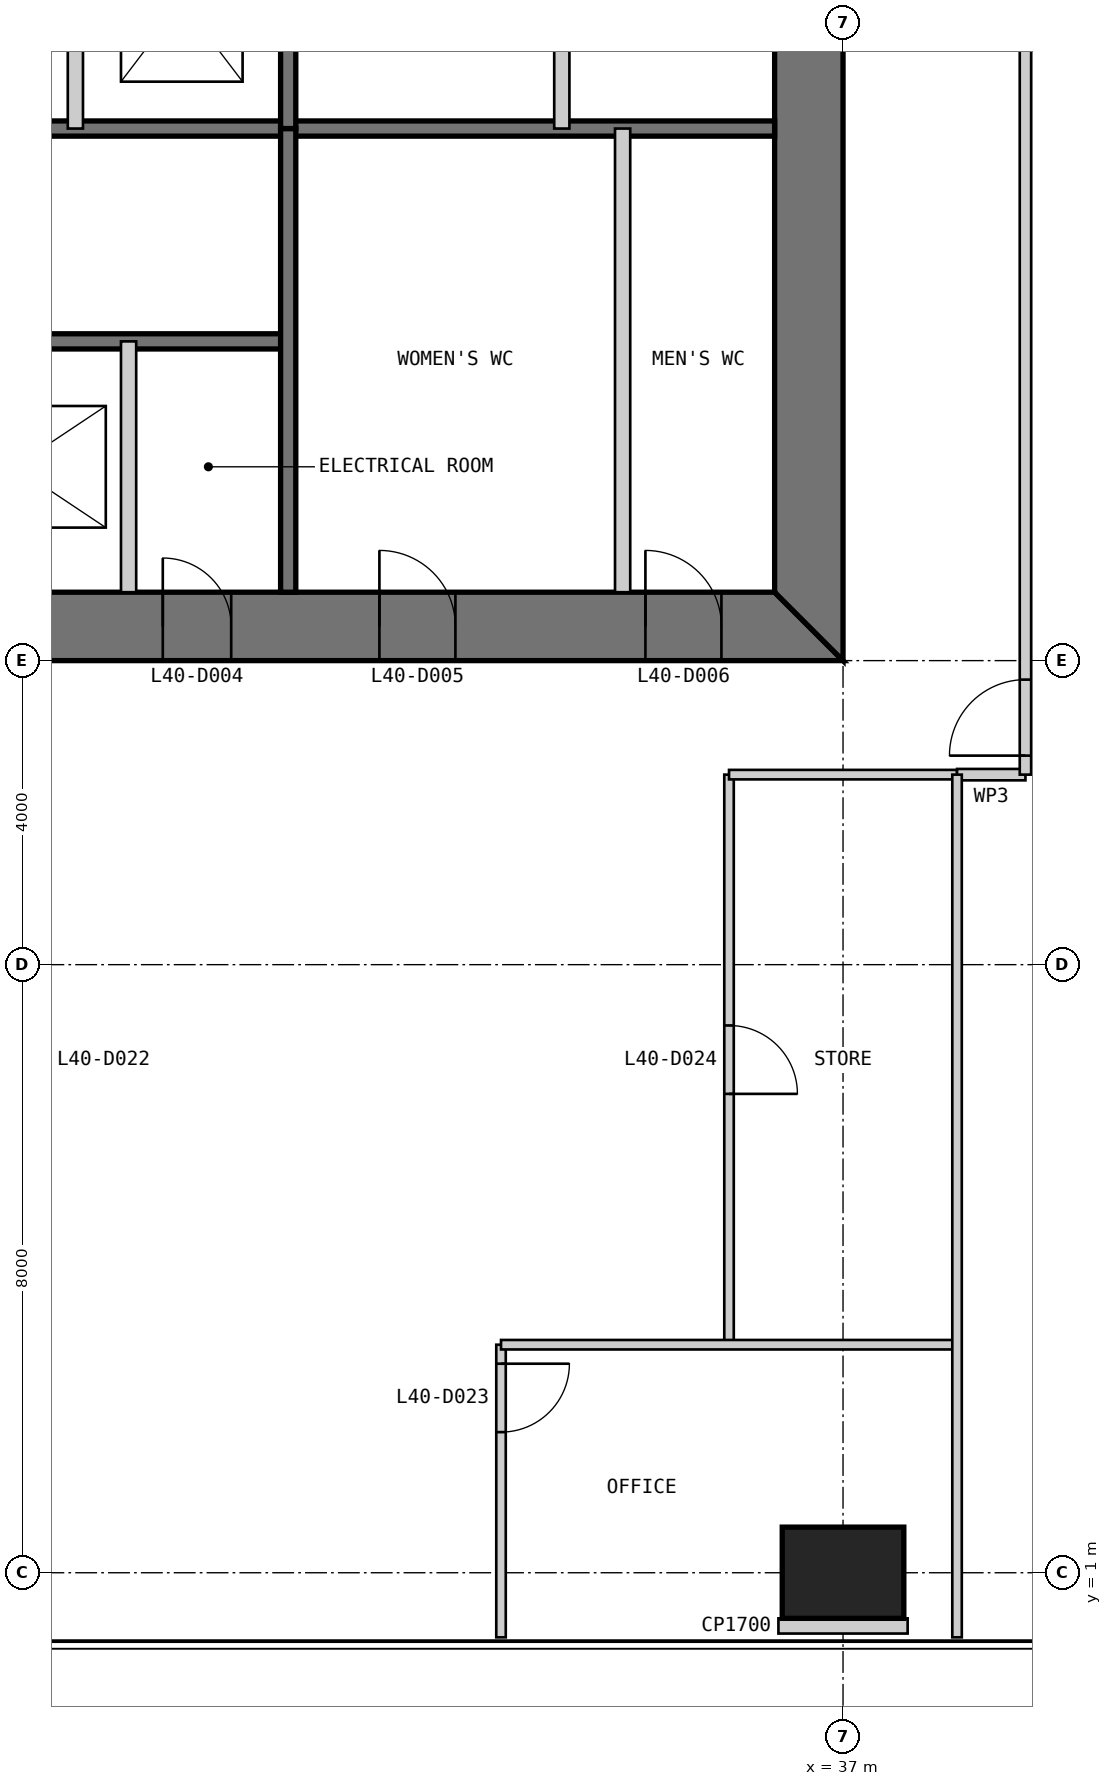
"""IFC4 building model, lengths in metres.
Left out: names, types, materials, properties, quantities, classifications, styles, units other than length and angle.
Written with IfcOpenShell. Run it as: python <this file> out.ifc"""

import sys

from ifc_helpers import new_model, si_unit, direction, frame, frame_2d, origin, origin_2d, place, context, subcontext, project, spatial, polyline, rectangle, outline, extrude, element, fill, save


model = new_model("IFC4")
c1 = context("Model", 3, precision=1e-05, world=origin(), true_north=direction((0.0, 1.0)))
c2 = subcontext(c1, "Body", "Model", "MODEL_VIEW")
j1 = project(units=[si_unit("LENGTHUNIT", "METRE"), si_unit("PLANEANGLEUNIT", "RADIAN")], contexts=[c1])
p1 = place(None, origin())
s1 = spatial("IfcSite", under=j1, at=p1, CompositionType="ELEMENT")
p2 = place(p1, origin())
s2 = spatial("IfcBuilding", under=s1, at=p2, CompositionType="ELEMENT")
p3 = place(p2, frame((0.0, 0.0, 173.8)))
s3 = spatial("IfcBuildingStorey", under=s2, at=p3, CompositionType="ELEMENT", Elevation=173.8)
p4 = place(p3, frame((37.0, 1.0, 0.0), z_axis=(0.0, 0.0, 1.0), x_axis=(1.0, 0.0, 0.0)))
e1 = element("IfcColumn", 1, at=p4, inside=s3, PredefinedType="COLUMN", context=c2, shape_type="SweptSolid", body=[
    extrude(rectangle(XDim=1.6, YDim=1.2, at=origin_2d()), origin(), (0.0, 0.0, 1.0), 4.0),
])
p5 = place(p3, frame((13.0, 13.45, 0.0), z_axis=(0.0, 0.0, 1.0), x_axis=(1.0, 0.0, 0.0)))
e2 = element("IfcWall", 2, at=p5, inside=s3, PredefinedType="SHEAR", context=c2, shape_type="SweptSolid", body=[
    extrude(outline(polyline([(0.0, -0.45), (24.0, -0.45), (23.1, 0.45), (0.9, 0.45), (0.0, -0.45)])), origin(), (0.0, 0.0, 1.0), 4.0),
])
p6 = place(p5, frame((4.9, 0.0, 0.0)))
e3 = element("IfcOpeningElement", 3, at=p6, cuts=e2, PredefinedType="OPENING", context=c2, shape_type="SweptSolid", body=[
    extrude(rectangle(XDim=1.0, YDim=2.2, at=frame_2d((0.5, 1.1))), frame((0.0, 0.46, 0.0), z_axis=(0.0, -1.0, 0.0), x_axis=(1.0, 0.0, 0.0)), (0.0, 0.0, 1.0), 0.92),
])
p7 = place(p5, frame((8.9, 0.0, 0.0)))
e4 = element("IfcOpeningElement", 4, at=p7, cuts=e2, PredefinedType="OPENING", context=c2, shape_type="SweptSolid", body=[
    extrude(rectangle(XDim=1.1, YDim=2.2, at=frame_2d((0.55, 1.1))), frame((0.0, 0.46, 0.0), z_axis=(0.0, -1.0, 0.0), x_axis=(1.0, 0.0, 0.0)), (0.0, 0.0, 1.0), 0.92),
])
p8 = place(p5, frame((15.05, 0.0, 0.0)))
e5 = element("IfcOpeningElement", 5, at=p8, cuts=e2, PredefinedType="OPENING", context=c2, shape_type="SweptSolid", body=[
    extrude(rectangle(XDim=0.9, YDim=2.2, at=frame_2d((0.45, 1.1))), frame((0.0, 0.46, 0.0), z_axis=(0.0, -1.0, 0.0), x_axis=(1.0, 0.0, 0.0)), (0.0, 0.0, 1.0), 0.92),
])
p9 = place(p5, frame((17.9, 0.0, 0.0)))
e6 = element("IfcOpeningElement", 6, at=p9, cuts=e2, PredefinedType="OPENING", context=c2, shape_type="SweptSolid", body=[
    extrude(rectangle(XDim=1.0, YDim=2.2, at=frame_2d((0.5, 1.1))), frame((0.0, 0.46, 0.0), z_axis=(0.0, -1.0, 0.0), x_axis=(1.0, 0.0, 0.0)), (0.0, 0.0, 1.0), 0.92),
])
p10 = place(p5, frame((21.4, 0.0, 0.0)))
e7 = element("IfcOpeningElement", 7, at=p10, cuts=e2, PredefinedType="OPENING", context=c2, shape_type="SweptSolid", body=[
    extrude(rectangle(XDim=1.0, YDim=2.2, at=frame_2d((0.5, 1.1))), frame((0.0, 0.46, 0.0), z_axis=(0.0, -1.0, 0.0), x_axis=(1.0, 0.0, 0.0)), (0.0, 0.0, 1.0), 0.92),
])
p11 = place(p3, frame((36.55, 13.9, 0.0), z_axis=(0.0, 0.0, 1.0), x_axis=(0.0, 1.0, 0.0)))
e8 = element("IfcWall", 8, at=p11, inside=s3, PredefinedType="SHEAR", context=c2, shape_type="SweptSolid", body=[
    extrude(outline(polyline([(-0.9, -0.45), (23.1, -0.45), (22.2, 0.45), (0.0, 0.45), (-0.9, -0.45)])), origin(), (0.0, 0.0, 1.0), 4.0),
])
p12 = place(p11, frame((20.2, 0.0, 0.0)))
e9 = element("IfcOpeningElement", 9, at=p12, cuts=e8, PredefinedType="OPENING", context=c2, shape_type="SweptSolid", body=[
    extrude(rectangle(XDim=1.0, YDim=2.2, at=frame_2d((0.5, 1.1))), frame((0.0, 0.46, 0.0), z_axis=(0.0, -1.0, 0.0), x_axis=(1.0, 0.0, 0.0)), (0.0, 0.0, 1.0), 0.92),
])
p13 = place(p11, frame((17.25, 0.0, 0.0)))
e10 = element("IfcOpeningElement", 10, at=p13, cuts=e8, PredefinedType="OPENING", context=c2, shape_type="SweptSolid", body=[
    extrude(rectangle(XDim=0.9, YDim=2.2, at=frame_2d((0.45, 1.1))), frame((0.0, 0.46, 0.0), z_axis=(0.0, -1.0, 0.0), x_axis=(1.0, 0.0, 0.0)), (0.0, 0.0, 1.0), 0.92),
])
p14 = place(p3, frame((20.3, 17.2, 0.0), z_axis=(0.0, 0.0, 1.0), x_axis=(1.0, 0.0, 0.0)))
e11 = element("IfcWall", 11, at=p14, inside=s3, PredefinedType="SOLIDWALL", context=c2, shape_type="SweptSolid", body=[
    extrude(rectangle(XDim=9.4, YDim=0.2, at=frame_2d((4.7, 0.0))), origin(), (0.0, 0.0, 1.0), 3.8),
])
p15 = place(p14, frame((0.25, 0.0, 0.0)))
e12 = element("IfcOpeningElement", 12, at=p15, cuts=e11, PredefinedType="OPENING", context=c2, shape_type="SweptSolid", body=[
    extrude(rectangle(XDim=1.0, YDim=2.2, at=frame_2d((0.5, 1.1))), frame((0.0, 0.11, 0.0), z_axis=(0.0, -1.0, 0.0), x_axis=(1.0, 0.0, 0.0)), (0.0, 0.0, 1.0), 0.22),
])
p16 = place(p3, frame((20.3, 20.0, 0.0), z_axis=(0.0, 0.0, 1.0), x_axis=(1.0, 0.0, 0.0)))
e13 = element("IfcWall", 13, at=p16, inside=s3, PredefinedType="SOLIDWALL", context=c2, shape_type="SweptSolid", body=[
    extrude(rectangle(XDim=15.8, YDim=0.2, at=frame_2d((7.9, 0.0))), origin(), (0.0, 0.0, 1.0), 3.8),
])
p17 = place(p3, frame((27.6, 13.9, 0.0), z_axis=(0.0, 0.0, 1.0), x_axis=(0.0, 1.0, 0.0)))
e14 = element("IfcWall", 14, at=p17, inside=s3, PredefinedType="PARTITIONING", context=c2, shape_type="SweptSolid", body=[
    extrude(rectangle(XDim=3.3, YDim=0.2, at=frame_2d((1.65, 0.0))), origin(), (0.0, 0.0, 1.0), 3.8),
])
p18 = place(p3, frame((29.7, 13.9, 0.0), z_axis=(0.0, 0.0, 1.0), x_axis=(0.0, 1.0, 0.0)))
e15 = element("IfcWall", 15, at=p18, inside=s3, PredefinedType="SOLIDWALL", context=c2, shape_type="SweptSolid", body=[
    extrude(rectangle(XDim=6.1, YDim=0.2, at=frame_2d((3.05, 0.0))), origin(), (0.0, 0.0, 1.0), 3.8),
])
p19 = place(p3, frame((34.1, 13.9, 0.0), z_axis=(0.0, 0.0, 1.0), x_axis=(0.0, 1.0, 0.0)))
e16 = element("IfcWall", 16, at=p19, inside=s3, PredefinedType="PARTITIONING", context=c2, shape_type="SweptSolid", body=[
    extrude(rectangle(XDim=6.1, YDim=0.2, at=frame_2d((3.05, 0.0))), origin(), (0.0, 0.0, 1.0), 3.8),
])
p20 = place(p3, frame((33.3, 36.1, 0.0), z_axis=(0.0, 0.0, 1.0), x_axis=(0.0, -1.0, 0.0)))
e17 = element("IfcWall", 17, at=p20, inside=s3, PredefinedType="PARTITIONING", context=c2, shape_type="SweptSolid", body=[
    extrude(rectangle(XDim=16.1, YDim=0.2, at=frame_2d((8.05, 0.0))), origin(), (0.0, 0.0, 1.0), 3.8),
])
p21 = place(p20, frame((4.1, 0.0, 0.0)))
e18 = element("IfcOpeningElement", 18, at=p21, cuts=e17, PredefinedType="OPENING", context=c2, shape_type="SweptSolid", body=[
    extrude(rectangle(XDim=0.9, YDim=2.2, at=frame_2d((0.45, 1.1))), frame((0.0, 0.11, 0.0), z_axis=(0.0, -1.0, 0.0), x_axis=(1.0, 0.0, 0.0)), (0.0, 0.0, 1.0), 0.22),
])
p22 = place(p3, frame((29.7, 36.1, 0.0), z_axis=(0.0, 0.0, 1.0), x_axis=(0.0, -1.0, 0.0)))
e19 = element("IfcWall", 19, at=p22, inside=s3, PredefinedType="SOLIDWALL", context=c2, shape_type="SweptSolid", body=[
    extrude(rectangle(XDim=16.1, YDim=0.2, at=frame_2d((8.05, 0.0))), origin(), (0.0, 0.0, 1.0), 3.8),
])
p23 = place(p22, frame((7.217, 0.0, 0.0)))
e20 = element("IfcOpeningElement", 20, at=p23, cuts=e19, PredefinedType="OPENING", context=c2, shape_type="SweptSolid", body=[
    extrude(rectangle(XDim=1.1, YDim=2.2, at=frame_2d((0.55, 1.1))), frame((0.0, 0.11, 0.0), z_axis=(0.0, -1.0, 0.0), x_axis=(1.0, 0.0, 0.0)), (0.0, 0.0, 1.0), 0.22),
])
p24 = place(p22, frame((10.55, 0.0, 0.0)))
e21 = element("IfcOpeningElement", 21, at=p24, cuts=e19, PredefinedType="OPENING", context=c2, shape_type="SweptSolid", body=[
    extrude(rectangle(XDim=1.1, YDim=2.2, at=frame_2d((0.55, 1.1))), frame((0.0, 0.11, 0.0), z_axis=(0.0, -1.0, 0.0), x_axis=(1.0, 0.0, 0.0)), (0.0, 0.0, 1.0), 0.22),
])
p25 = place(p22, frame((13.883, 0.0, 0.0)))
e22 = element("IfcOpeningElement", 22, at=p25, cuts=e19, PredefinedType="OPENING", context=c2, shape_type="SweptSolid", body=[
    extrude(rectangle(XDim=1.1, YDim=2.2, at=frame_2d((0.55, 1.1))), frame((0.0, 0.11, 0.0), z_axis=(0.0, -1.0, 0.0), x_axis=(1.0, 0.0, 0.0)), (0.0, 0.0, 1.0), 0.22),
])
p26 = place(p3, frame((26.9, 30.0, 0.0), z_axis=(0.0, 0.0, 1.0), x_axis=(0.0, -1.0, 0.0)))
e23 = element("IfcWall", 23, at=p26, inside=s3, PredefinedType="PARTITIONING", context=c2, shape_type="SweptSolid", body=[
    extrude(rectangle(XDim=10.0, YDim=0.2, at=frame_2d((5.0, 0.0))), origin(), (0.0, 0.0, 1.0), 3.8),
])
p27 = place(p3, frame((32.5, 0.15, 0.0), z_axis=(0.0, 0.0, 1.0), x_axis=(0.0, 1.0, 0.0)))
e24 = element("IfcWall", 24, at=p27, inside=s3, PredefinedType="PARTITIONING", context=c2, shape_type="SweptSolid", body=[
    extrude(rectangle(XDim=3.85, YDim=0.125, at=frame_2d((1.925, 0.0))), origin(), (0.0, 0.0, 1.0), 3.85),
])
p28 = place(p27, frame((2.7, 0.0, 0.0)))
e25 = element("IfcOpeningElement", 25, at=p28, cuts=e24, PredefinedType="OPENING", context=c2, shape_type="SweptSolid", body=[
    extrude(rectangle(XDim=0.9, YDim=2.2, at=frame_2d((0.45, 1.1))), frame((0.0, 0.073, 0.0), z_axis=(0.0, -1.0, 0.0), x_axis=(1.0, 0.0, 0.0)), (0.0, 0.0, 1.0), 0.145),
])
p29 = place(p3, frame((35.5, 4.0, 0.0), z_axis=(0.0, 0.0, 1.0), x_axis=(0.0, 1.0, 0.0)))
e26 = element("IfcWall", 26, at=p29, inside=s3, PredefinedType="PARTITIONING", context=c2, shape_type="SweptSolid", body=[
    extrude(rectangle(XDim=7.5, YDim=0.125, at=frame_2d((3.75, 0.0))), origin(), (0.0, 0.0, 1.0), 3.85),
])
p30 = place(p29, frame((3.3, 0.0, 0.0)))
e27 = element("IfcOpeningElement", 27, at=p30, cuts=e26, PredefinedType="OPENING", context=c2, shape_type="SweptSolid", body=[
    extrude(rectangle(XDim=0.9, YDim=2.2, at=frame_2d((0.45, 1.1))), frame((0.0, 0.073, 0.0), z_axis=(0.0, -1.0, 0.0), x_axis=(1.0, 0.0, 0.0)), (0.0, 0.0, 1.0), 0.145),
])
p31 = place(p3, frame((32.5, 4.0, 0.0), z_axis=(0.0, 0.0, 1.0), x_axis=(1.0, 0.0, 0.0)))
e28 = element("IfcWall", 28, at=p31, inside=s3, PredefinedType="PARTITIONING", context=c2, shape_type="SweptSolid", body=[
    extrude(rectangle(XDim=6.0, YDim=0.125, at=frame_2d((3.0, 0.0))), origin(), (0.0, 0.0, 1.0), 3.85),
])
p32 = place(p3, frame((35.5, 11.5, 0.0), z_axis=(0.0, 0.0, 1.0), x_axis=(1.0, 0.0, 0.0)))
e29 = element("IfcWall", 29, at=p32, inside=s3, PredefinedType="PARTITIONING", context=c2, shape_type="SweptSolid", body=[
    extrude(rectangle(XDim=3.0, YDim=0.125, at=frame_2d((1.5, 0.0))), origin(), (0.0, 0.0, 1.0), 3.85),
])
p33 = place(p3, frame((38.5, 11.5, 0.0), z_axis=(0.0, 0.0, 1.0), x_axis=(1.0, 0.0, 0.0)))
e30 = element("IfcWall", 30, at=p33, inside=s3, PredefinedType="PARTITIONING", context=c2, shape_type="SweptSolid", body=[
    extrude(rectangle(XDim=0.9, YDim=0.15, at=frame_2d((0.45, 0.0))), origin(), (0.0, 0.0, 1.0), 3.85),
])
p34 = place(p3, frame((39.4, 11.5, 0.0), z_axis=(0.0, 0.0, 1.0), x_axis=(0.0, 1.0, 0.0)))
e31 = element("IfcWall", 31, at=p34, inside=s3, PredefinedType="PARTITIONING", context=c2, shape_type="SweptSolid", body=[
    extrude(rectangle(XDim=27.0, YDim=0.15, at=frame_2d((13.5, 0.0))), origin(), (0.0, 0.0, 1.0), 3.85),
])
p35 = place(p34, frame((16.0, 0.0, 0.0)))
e32 = element("IfcOpeningElement", 32, at=p35, cuts=e31, PredefinedType="OPENING", context=c2, shape_type="SweptSolid", body=[
    extrude(rectangle(XDim=1.0, YDim=2.2, at=frame_2d((0.5, 1.1))), frame((0.0, 0.085, 0.0), z_axis=(0.0, -1.0, 0.0), x_axis=(1.0, 0.0, 0.0)), (0.0, 0.0, 1.0), 0.17),
])
p36 = place(p34, frame((0.25, 0.0, 0.0)))
e33 = element("IfcOpeningElement", 33, at=p36, cuts=e31, PredefinedType="OPENING", context=c2, shape_type="SweptSolid", body=[
    extrude(rectangle(XDim=1.0, YDim=2.2, at=frame_2d((0.5, 1.1))), frame((0.0, 0.085, 0.0), z_axis=(0.0, -1.0, 0.0), x_axis=(1.0, 0.0, 0.0)), (0.0, 0.0, 1.0), 0.17),
])
p37 = place(p34, frame((10.75, 0.0, 0.0)))
e34 = element("IfcOpeningElement", 34, at=p37, cuts=e31, PredefinedType="OPENING", context=c2, shape_type="SweptSolid", body=[
    extrude(rectangle(XDim=1.0, YDim=2.2, at=frame_2d((0.5, 1.1))), frame((0.0, 0.085, 0.0), z_axis=(0.0, -1.0, 0.0), x_axis=(1.0, 0.0, 0.0)), (0.0, 0.0, 1.0), 0.17),
])
p38 = place(p34, frame((22.0, 0.0, 0.0)))
e35 = element("IfcOpeningElement", 35, at=p38, cuts=e31, PredefinedType="OPENING", context=c2, shape_type="SweptSolid", body=[
    extrude(rectangle(XDim=1.0, YDim=2.2, at=frame_2d((0.5, 1.1))), frame((0.0, 0.085, 0.0), z_axis=(0.0, -1.0, 0.0), x_axis=(1.0, 0.0, 0.0)), (0.0, 0.0, 1.0), 0.17),
])
p39 = place(p34, frame((25.0, 0.0, 0.0)))
e36 = element("IfcOpeningElement", 36, at=p39, cuts=e31, PredefinedType="OPENING", context=c2, shape_type="SweptSolid", body=[
    extrude(rectangle(XDim=1.0, YDim=2.2, at=frame_2d((0.5, 1.1))), frame((0.0, 0.085, 0.0), z_axis=(0.0, -1.0, 0.0), x_axis=(1.0, 0.0, 0.0)), (0.0, 0.0, 1.0), 0.17),
])
p40 = place(p3, frame((38.5, 0.15, 0.0), z_axis=(0.0, 0.0, 1.0), x_axis=(0.0, 1.0, 0.0)))
e37 = element("IfcWall", 37, at=p40, inside=s3, PredefinedType="PARTITIONING", context=c2, shape_type="SweptSolid", body=[
    extrude(rectangle(XDim=11.35, YDim=0.125, at=frame_2d((5.675, 0.0))), origin(), (0.0, 0.0, 1.0), 3.85),
])
p41 = place(p3, frame((37.0, 0.2, 0.0), z_axis=(0.0, 0.0, 1.0), x_axis=(0.0, 1.0, 0.0)))
e38 = element("IfcWall", 38, at=p41, inside=s3, PredefinedType="PARTITIONING", context=c2, shape_type="SweptSolid", body=[
    extrude(rectangle(XDim=0.2, YDim=1.7, at=frame_2d((0.1, 0.0))), origin(), (0.0, 0.0, 1.0), 3.85),
])
p42 = place(p8, origin())
e39 = element("IfcDoor", 39, at=p42, inside=s3, OperationType="SINGLE_SWING_LEFT", PredefinedType="DOOR", context=c2, shape_type="SweptSolid", body=[
    extrude(rectangle(XDim=0.9, YDim=2.2, at=frame_2d((0.45, 1.1))), frame((0.0, 0.025, 0.0), z_axis=(0.0, -1.0, 0.0), x_axis=(1.0, 0.0, 0.0)), (0.0, 0.0, 1.0), 0.05),
    extrude(outline(polyline([(0.0, 0.0), (0.04, 0.0), (0.04, 2.16), (0.86, 2.16), (0.86, 0.0), (0.9, 0.0), (0.9, 2.2), (0.0, 2.2), (0.0, 0.0)])), frame((0.0, 0.3, 0.0), z_axis=(0.0, -1.0, 0.0), x_axis=(1.0, 0.0, 0.0)), (0.0, 0.0, 1.0), 0.6),
])
fill(e5, e39)
p43 = place(p9, origin())
e40 = element("IfcDoor", 40, at=p43, inside=s3, OperationType="SINGLE_SWING_LEFT", PredefinedType="DOOR", context=c2, shape_type="SweptSolid", body=[
    extrude(rectangle(XDim=1.0, YDim=2.2, at=frame_2d((0.5, 1.1))), frame((0.0, 0.025, 0.0), z_axis=(0.0, -1.0, 0.0), x_axis=(1.0, 0.0, 0.0)), (0.0, 0.0, 1.0), 0.05),
    extrude(outline(polyline([(0.0, 0.0), (0.04, 0.0), (0.04, 2.16), (0.96, 2.16), (0.96, 0.0), (1.0, 0.0), (1.0, 2.2), (0.0, 2.2), (0.0, 0.0)])), frame((0.0, 0.3, 0.0), z_axis=(0.0, -1.0, 0.0), x_axis=(1.0, 0.0, 0.0)), (0.0, 0.0, 1.0), 0.6),
])
fill(e6, e40)
p44 = place(p10, origin())
e41 = element("IfcDoor", 41, at=p44, inside=s3, OperationType="SINGLE_SWING_LEFT", PredefinedType="DOOR", context=c2, shape_type="SweptSolid", body=[
    extrude(rectangle(XDim=1.0, YDim=2.2, at=frame_2d((0.5, 1.1))), frame((0.0, 0.025, 0.0), z_axis=(0.0, -1.0, 0.0), x_axis=(1.0, 0.0, 0.0)), (0.0, 0.0, 1.0), 0.05),
    extrude(outline(polyline([(0.0, 0.0), (0.04, 0.0), (0.04, 2.16), (0.96, 2.16), (0.96, 0.0), (1.0, 0.0), (1.0, 2.2), (0.0, 2.2), (0.0, 0.0)])), frame((0.0, 0.3, 0.0), z_axis=(0.0, -1.0, 0.0), x_axis=(1.0, 0.0, 0.0)), (0.0, 0.0, 1.0), 0.6),
])
fill(e7, e41)
p45 = place(p28, frame((0.9, 0.0, 0.0), z_axis=(0.0, 0.0, 1.0), x_axis=(-1.0, 0.0, 0.0)))
e42 = element("IfcDoor", 42, at=p45, inside=s3, OperationType="SINGLE_SWING_LEFT", PredefinedType="DOOR", context=c2, shape_type="SweptSolid", body=[
    extrude(rectangle(XDim=0.9, YDim=2.2, at=frame_2d((0.45, 1.1))), frame((0.0, 0.025, 0.0), z_axis=(0.0, -1.0, 0.0), x_axis=(1.0, 0.0, 0.0)), (0.0, 0.0, 1.0), 0.05),
])
fill(e25, e42)
p46 = place(p30, frame((0.9, 0.0, 0.0), z_axis=(0.0, 0.0, 1.0), x_axis=(-1.0, 0.0, 0.0)))
e43 = element("IfcDoor", 43, at=p46, inside=s3, OperationType="SINGLE_SWING_RIGHT", PredefinedType="DOOR", context=c2, shape_type="SweptSolid", body=[
    extrude(rectangle(XDim=0.9, YDim=2.2, at=frame_2d((0.45, 1.1))), frame((0.0, 0.025, 0.0), z_axis=(0.0, -1.0, 0.0), x_axis=(1.0, 0.0, 0.0)), (0.0, 0.0, 1.0), 0.05),
])
fill(e27, e43)
p47 = place(p36, origin())
e44 = element("IfcDoor", 44, at=p47, inside=s3, OperationType="SINGLE_SWING_LEFT", PredefinedType="DOOR", context=c2, shape_type="SweptSolid", body=[
    extrude(rectangle(XDim=1.0, YDim=2.2, at=frame_2d((0.5, 1.1))), frame((0.0, 0.025, 0.0), z_axis=(0.0, -1.0, 0.0), x_axis=(1.0, 0.0, 0.0)), (0.0, 0.0, 1.0), 0.05),
])
fill(e33, e44)
save(model, sys.argv[1])
